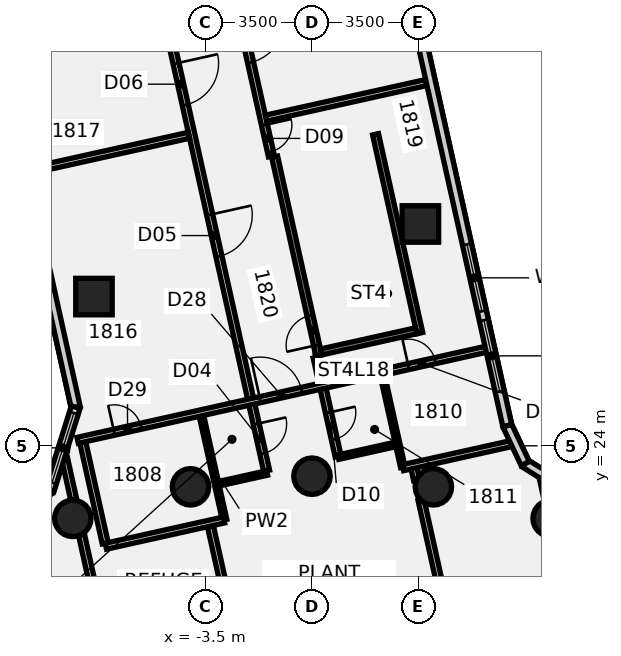
"""IFC4 building model, lengths in metres.
Left out: names, types, materials, properties, quantities, classifications, styles, units other than length and angle.
Written with IfcOpenShell. Run it as: python <this file> out.ifc"""

import sys

from ifc_helpers import new_model, si_unit, direction, frame, frame_2d, origin, origin_2d, place, context, subcontext, project, spatial, polyline, rectangle, circle, outline, extrude, element, fill, save


model = new_model("IFC4")
c1 = context("Model", 3, precision=1e-05, world=origin(), true_north=direction((0.0, 1.0)))
c2 = subcontext(c1, "Body", "Model", "MODEL_VIEW")
j1 = project(units=[si_unit("LENGTHUNIT", "METRE"), si_unit("PLANEANGLEUNIT", "RADIAN")], contexts=[c1])
p1 = place(None, origin())
s1 = spatial("IfcSite", under=j1, at=p1, CompositionType="ELEMENT")
p2 = place(p1, origin())
s2 = spatial("IfcBuilding", under=s1, at=p2, CompositionType="ELEMENT")
p3 = place(p2, frame((0.0, 0.0, 79.0)))
s3 = spatial("IfcBuildingStorey", under=s2, at=p3, CompositionType="ELEMENT", Elevation=79.0)
for number, where, z_axis, x_axis in (
    (1, (7.866, 21.613, -0.18), (0.0, 0.0, 1.0), (1.0, 0.0, 0.0)),
    (2, (3.994, 22.651, -0.18), (0.0, 0.0, 1.0), (1.0, 0.0, 0.0)),
    (3, (0.0, 23.0, -0.18), (0.0, 0.0, 1.0), (1.0, 0.0, 0.0)),
    (4, (-3.994, 22.651, -0.18), (0.0, 0.0, 1.0), (1.0, 0.0, 0.0)),
    (5, (-7.866, 21.613, -0.18), (0.0, 0.0, 1.0), (1.0, 0.0, 0.0)),
):
    element("IfcColumn", number, at=place(p3, frame(where, z_axis=z_axis, x_axis=x_axis)), inside=s3, PredefinedType="COLUMN", context=c2, shape_type="SweptSolid", body=[
        extrude(circle(Radius=0.6, at=origin_2d()), origin(), (0.0, 0.0, 1.0), 4.54),
    ])
p4 = place(p3, frame((-9.125, 37.693, -0.173), z_axis=(-0.06251280535, -0.037120340526, 0.997353613061), x_axis=(0.973970607022, 0.215890896147, 0.069082397308)))
e6 = element("IfcColumn", 6, at=p4, inside=s3, PredefinedType="COLUMN", context=c2, shape_type="SweptSolid", body=[
    extrude(rectangle(XDim=1.2, YDim=1.2, at=origin_2d()), origin(), (0.0, 0.0, 1.0), 4.538),
])
p5 = place(p3, frame((-7.171, 28.908, -0.175), z_axis=(-0.027459467491, -0.029020888191, 0.999201564097), x_axis=(0.975725272019, 0.21648201457, 0.033101826414)))
e7 = element("IfcColumn", 7, at=p5, inside=s3, PredefinedType="COLUMN", context=c2, shape_type="SweptSolid", body=[
    extrude(rectangle(XDim=1.2, YDim=1.2, at=origin_2d()), origin(), (0.0, 0.0, 1.0), 4.534),
])
p6 = place(p3, frame((3.567, 31.296, -0.175), z_axis=(-0.037418269579, 0.013944362332, 0.999202395844), x_axis=(0.21721764254, -0.975880776515, 0.021753293964)))
e8 = element("IfcColumn", 8, at=p6, inside=s3, PredefinedType="COLUMN", context=c2, shape_type="SweptSolid", body=[
    extrude(rectangle(XDim=1.2, YDim=1.2, at=origin_2d()), origin(), (0.0, 0.0, 1.0), 4.535),
])
p7 = place(p3, frame((-8.14, 23.592, 0.0), z_axis=(0.0, 0.0, 1.0), x_axis=(0.21709529859, -0.976150414296, 0.0)))
e9 = element("IfcWall", 9, at=p7, inside=s3, PredefinedType="PARTITIONING", context=c2, shape_type="SweptSolid", body=[
    extrude(rectangle(XDim=1.411, YDim=0.2, at=frame_2d((0.706, 0.0))), origin(), (0.0, 0.0, 1.0), 3.66),
])
p8 = place(p3, frame((-7.581, 21.079, 0.0), z_axis=(0.0, 0.0, 1.0), x_axis=(0.217055556544, -0.976159252055, 0.0)))
e10 = element("IfcWall", 10, at=p8, inside=s3, PredefinedType="PARTITIONING", context=c2, shape_type="SweptSolid", body=[
    extrude(rectangle(XDim=9.299, YDim=0.2, at=frame_2d((4.649, 0.0))), origin(), (0.0, 0.0, 1.0), 3.66),
])
p9 = place(p3, frame((-7.538, 24.115, 0.0), z_axis=(0.0, 0.0, 1.0), x_axis=(0.216877248521, -0.976198882951, 0.0)))
e11 = element("IfcWall", 11, at=p9, inside=s3, PredefinedType="PARTITIONING", context=c2, shape_type="SweptSolid", body=[
    extrude(rectangle(XDim=3.401, YDim=0.2, at=frame_2d((1.7, 0.0))), origin(), (0.0, 0.0, 1.0), 3.66),
])
p10 = place(p3, frame((-4.905, 38.529, 0.0), z_axis=(0.0, 0.0, 1.0), x_axis=(0.217093198674, -0.976150881314, 0.0)))
e12 = element("IfcWall", 12, at=p10, inside=s3, PredefinedType="PARTITIONING", context=c2, shape_type="SweptSolid", body=[
    extrude(rectangle(XDim=15.725, YDim=0.2, at=frame_2d((7.863, 0.0))), origin(), (0.0, 0.0, 1.0), 3.66),
])
p11 = place(p10, frame((14.15, 0.0, 0.0)))
e13 = element("IfcOpeningElement", 13, at=p11, cuts=e12, PredefinedType="OPENING", context=c2, shape_type="SweptSolid", body=[
    extrude(rectangle(XDim=1.0, YDim=2.1, at=frame_2d((0.5, 1.05))), frame((0.0, 0.11, 0.0), z_axis=(0.0, -1.0, 0.0), x_axis=(1.0, 0.0, 0.0)), (0.0, 0.0, 1.0), 0.22),
])
p12 = place(p10, frame((7.1, 0.0, 0.0)))
e14 = element("IfcOpeningElement", 14, at=p12, cuts=e12, PredefinedType="OPENING", context=c2, shape_type="SweptSolid", body=[
    extrude(rectangle(XDim=1.4, YDim=2.1, at=frame_2d((0.7, 1.05))), frame((0.0, 0.11, 0.0), z_axis=(0.0, -1.0, 0.0), x_axis=(1.0, 0.0, 0.0)), (0.0, 0.0, 1.0), 0.22),
])
p13 = place(p10, frame((2.0, 0.0, 0.0)))
e15 = element("IfcOpeningElement", 15, at=p13, cuts=e12, PredefinedType="OPENING", context=c2, shape_type="SweptSolid", body=[
    extrude(rectangle(XDim=1.4, YDim=2.1, at=frame_2d((0.7, 1.05))), frame((0.0, 0.11, 0.0), z_axis=(0.0, -1.0, 0.0), x_axis=(1.0, 0.0, 0.0)), (0.0, 0.0, 1.0), 0.22),
])
p14 = place(p3, frame((-3.634, 24.982, 0.0), z_axis=(0.0, 0.0, 1.0), x_axis=(0.217211102437, -0.976124652377, 0.0)))
e16 = element("IfcWall", 16, at=p14, inside=s3, PredefinedType="PARTITIONING", context=c2, shape_type="SweptSolid", body=[
    extrude(rectangle(XDim=3.5, YDim=0.15, at=frame_2d((1.75, 0.0))), origin(), (0.0, 0.0, 1.0), 3.66),
])
p15 = place(p3, frame((-3.34, 21.359, 0.0), z_axis=(0.0, 0.0, 1.0), x_axis=(0.217054509475, -0.976159484878, 0.0)))
e17 = element("IfcWall", 17, at=p15, inside=s3, PredefinedType="PARTITIONING", context=c2, shape_type="SweptSolid", body=[
    extrude(rectangle(XDim=9.585, YDim=0.2, at=frame_2d((4.793, 0.0))), origin(), (0.0, 0.0, 1.0), 3.66),
])
p16 = place(p15, frame((5.0, 0.0, 0.0)))
e18 = element("IfcOpeningElement", 18, at=p16, cuts=e17, PredefinedType="OPENING", context=c2, shape_type="SweptSolid", body=[
    extrude(rectangle(XDim=1.8, YDim=2.1, at=frame_2d((0.9, 1.05))), frame((0.0, 0.11, 0.0), z_axis=(0.0, -1.0, 0.0), x_axis=(1.0, 0.0, 0.0)), (0.0, 0.0, 1.0), 0.22),
])
p17 = place(p3, frame((-2.562, 39.05, 0.0), z_axis=(0.0, 0.0, 1.0), x_axis=(0.217021787463, -0.976166760224, 0.0)))
e19 = element("IfcWall", 19, at=p17, inside=s3, PredefinedType="PARTITIONING", context=c2, shape_type="SweptSolid", body=[
    extrude(rectangle(XDim=5.661, YDim=0.2, at=frame_2d((2.831, 0.0))), origin(), (0.0, 0.0, 1.0), 3.66),
])
p18 = place(p17, frame((1.1, 0.0, 0.0)))
e20 = element("IfcOpeningElement", 20, at=p18, cuts=e19, PredefinedType="OPENING", context=c2, shape_type="SweptSolid", body=[
    extrude(rectangle(XDim=1.4, YDim=2.1, at=frame_2d((0.7, 1.05))), frame((0.0, 0.11, 0.0), z_axis=(0.0, -1.0, 0.0), x_axis=(1.0, 0.0, 0.0)), (0.0, 0.0, 1.0), 0.22),
])
p19 = place(p17, frame((4.611, 0.0, 0.0)))
e21 = element("IfcOpeningElement", 21, at=p19, cuts=e19, PredefinedType="OPENING", context=c2, shape_type="SweptSolid", body=[
    extrude(rectangle(XDim=0.9, YDim=2.1, at=frame_2d((0.45, 1.05))), frame((0.0, 0.11, 0.0), z_axis=(0.0, -1.0, 0.0), x_axis=(1.0, 0.0, 0.0)), (0.0, 0.0, 1.0), 0.22),
])
p20 = place(p3, frame((0.138, 26.907, 0.0), z_axis=(0.0, 0.0, 1.0), x_axis=(0.217031075357, -0.976164695289, 0.0)))
e22 = element("IfcWall", 22, at=p20, inside=s3, PredefinedType="PARTITIONING", context=c2, shape_type="SweptSolid", body=[
    extrude(rectangle(XDim=3.34, YDim=0.2, at=frame_2d((1.67, 0.0))), origin(), (0.0, 0.0, 1.0), 3.66),
])
p21 = place(p20, frame((1.86, 0.0, 0.0)))
e23 = element("IfcOpeningElement", 23, at=p21, cuts=e22, PredefinedType="OPENING", context=c2, shape_type="SweptSolid", body=[
    extrude(rectangle(XDim=0.9, YDim=2.1, at=frame_2d((0.45, 1.05))), frame((0.0, 0.11, 0.0), z_axis=(0.0, -1.0, 0.0), x_axis=(1.0, 0.0, 0.0)), (0.0, 0.0, 1.0), 0.22),
])
p22 = place(p3, frame((2.32, 26.311, 0.0), z_axis=(0.0, 0.0, 1.0), x_axis=(0.216662333141, -0.976246604807, 0.0)))
e24 = element("IfcWall", 24, at=p22, inside=s3, PredefinedType="PARTITIONING", context=c2, shape_type="SweptSolid", body=[
    extrude(rectangle(XDim=3.085, YDim=0.15, at=frame_2d((1.542, 0.0))), origin(), (0.0, 0.0, 1.0), 3.66),
])
p23 = place(p3, frame((3.357, 23.258, 0.0), z_axis=(0.0, 0.0, 1.0), x_axis=(0.216995545152, -0.976172594055, 0.0)))
e25 = element("IfcWall", 25, at=p23, inside=s3, PredefinedType="PARTITIONING", context=c2, shape_type="SweptSolid", body=[
    extrude(rectangle(XDim=0.397, YDim=0.2, at=frame_2d((0.199, 0.0))), origin(), (0.0, 0.0, 1.0), 3.66),
])
p24 = place(p3, frame((3.587, 22.225, 0.0), z_axis=(0.0, 0.0, 1.0), x_axis=(0.21703911185, -0.976162908498, 0.0)))
e26 = element("IfcWall", 26, at=p24, inside=s3, PredefinedType="PARTITIONING", context=c2, shape_type="SweptSolid", body=[
    extrude(rectangle(XDim=10.468, YDim=0.2, at=frame_2d((5.234, 0.0))), origin(), (0.0, 0.0, 1.0), 3.66),
])
p25 = place(p24, frame((3.15, 0.0, 0.0)))
e27 = element("IfcOpeningElement", 27, at=p25, cuts=e26, PredefinedType="OPENING", context=c2, shape_type="SweptSolid", body=[
    extrude(rectangle(XDim=1.8, YDim=2.1, at=frame_2d((0.9, 1.05))), frame((0.0, 0.11, 0.0), z_axis=(0.0, -1.0, 0.0), x_axis=(1.0, 0.0, 0.0)), (0.0, 0.0, 1.0), 0.22),
])
p26 = place(p3, frame((7.589, 22.882, 0.0), z_axis=(0.0, 0.0, 1.0), x_axis=(0.217003399532, -0.976170848055, 0.0)))
e28 = element("IfcWall", 28, at=p26, inside=s3, PredefinedType="PARTITIONING", context=c2, shape_type="SweptSolid", body=[
    extrude(rectangle(XDim=0.709, YDim=0.2, at=frame_2d((0.354, 0.0))), origin(), (0.0, 0.0, 1.0), 3.66),
])
p27 = place(p3, frame((-9.333, 33.037, 0.0), z_axis=(0.0, 0.0, 1.0), x_axis=(0.976161593011, 0.217045028348, 0.0)))
e29 = element("IfcWall", 29, at=p27, inside=s3, PredefinedType="PARTITIONING", context=c2, shape_type="SweptSolid", body=[
    extrude(rectangle(XDim=5.415, YDim=0.2, at=frame_2d((2.708, 0.0))), origin(), (0.0, 0.0, 1.0), 3.66),
])
p28 = place(p3, frame((-1.51, 34.777, 0.0), z_axis=(0.0, 0.0, 1.0), x_axis=(0.976168968701, 0.217011853467, 0.0)))
e30 = element("IfcWall", 30, at=p28, inside=s3, PredefinedType="PARTITIONING", context=c2, shape_type="SweptSolid", body=[
    extrude(rectangle(XDim=5.399, YDim=0.2, at=frame_2d((2.699, 0.0))), origin(), (0.0, 0.0, 1.0), 3.66),
])
p29 = place(p3, frame((-7.707, 24.179, 0.0), z_axis=(0.0, 0.0, 1.0), x_axis=(0.976033065583, 0.21762227572, 0.0)))
e31 = element("IfcWall", 31, at=p29, inside=s3, PredefinedType="PARTITIONING", context=c2, shape_type="SweptSolid", body=[
    extrude(rectangle(XDim=13.75, YDim=0.2, at=frame_2d((6.875, 0.0))), origin(), (0.0, 0.0, 1.0), 3.66),
])
p30 = place(p29, frame((6.151, 0.0, 0.0)))
e32 = element("IfcOpeningElement", 32, at=p30, cuts=e31, PredefinedType="OPENING", context=c2, shape_type="SweptSolid", body=[
    extrude(rectangle(XDim=1.4, YDim=2.1, at=frame_2d((0.7, 1.05))), frame((0.0, 0.11, 0.0), z_axis=(0.0, -1.0, 0.0), x_axis=(1.0, 0.0, 0.0)), (0.0, 0.0, 1.0), 0.22),
])
p31 = place(p29, frame((1.23, 0.0, 0.0)))
e33 = element("IfcOpeningElement", 33, at=p31, cuts=e31, PredefinedType="OPENING", context=c2, shape_type="SweptSolid", body=[
    extrude(rectangle(XDim=0.9, YDim=2.1, at=frame_2d((0.45, 1.05))), frame((0.0, 0.11, 0.0), z_axis=(0.0, -1.0, 0.0), x_axis=(1.0, 0.0, 0.0)), (0.0, 0.0, 1.0), 0.22),
])
p32 = place(p29, frame((11.151, 0.0, 0.0)))
e34 = element("IfcOpeningElement", 34, at=p32, cuts=e31, PredefinedType="OPENING", context=c2, shape_type="SweptSolid", body=[
    extrude(rectangle(XDim=0.9, YDim=2.1, at=frame_2d((0.45, 1.05))), frame((0.0, 0.11, 0.0), z_axis=(0.0, -1.0, 0.0), x_axis=(1.0, 0.0, 0.0)), (0.0, 0.0, 1.0), 0.22),
])
p33 = place(p3, frame((-6.779, 20.697, 0.0), z_axis=(0.0, 0.0, 1.0), x_axis=(0.976146636843, 0.217112282887, 0.0)))
e35 = element("IfcWall", 35, at=p33, inside=s3, PredefinedType="PARTITIONING", context=c2, shape_type="SweptSolid", body=[
    extrude(rectangle(XDim=3.981, YDim=0.2, at=frame_2d((1.99, 0.0))), origin(), (0.0, 0.0, 1.0), 3.66),
])
p34 = place(p3, frame((-3.057, 22.754, 0.0), z_axis=(0.0, 0.0, 1.0), x_axis=(0.976179969389, 0.216962363933, 0.0)))
e36 = element("IfcWall", 36, at=p34, inside=s3, PredefinedType="PARTITIONING", context=c2, shape_type="SweptSolid", body=[
    extrude(rectangle(XDim=1.62, YDim=0.15, at=frame_2d((0.81, 0.0))), origin(), (0.0, 0.0, 1.0), 3.66),
])
p35 = place(p3, frame((0.867, 23.627, 0.0), z_axis=(0.0, 0.0, 1.0), x_axis=(0.976187060184, 0.216930457819, 0.0)))
e37 = element("IfcWall", 37, at=p35, inside=s3, PredefinedType="PARTITIONING", context=c2, shape_type="SweptSolid", body=[
    extrude(rectangle(XDim=1.925, YDim=0.15, at=frame_2d((0.962, 0.0))), origin(), (0.0, 0.0, 1.0), 3.66),
])
p36 = place(p3, frame((2.993, 23.28, 0.0), z_axis=(0.0, 0.0, 1.0), x_axis=(0.976190222355, 0.21691622756, 0.0)))
e38 = element("IfcWall", 38, at=p36, inside=s3, PredefinedType="PARTITIONING", context=c2, shape_type="SweptSolid", body=[
    extrude(rectangle(XDim=3.633, YDim=0.2, at=frame_2d((1.816, 0.0))), origin(), (0.0, 0.0, 1.0), 3.66),
])
p37 = place(p3, frame((9.483, 21.879, 0.0), z_axis=(0.0, 0.0, 1.0), x_axis=(-0.848648189987, 0.528957701174, 0.0)))
e39 = element("IfcWall", 39, at=p37, inside=s3, PredefinedType="SOLIDWALL", context=c2, shape_type="SweptSolid", body=[
    extrude(rectangle(XDim=2.91, YDim=0.3, at=frame_2d((1.455, 0.0))), origin(), (0.0, 0.0, 1.0), 4.36),
])
p38 = place(p37, frame((0.39, 0.0, 1.4)))
e40 = element("IfcOpeningElement", 40, at=p38, cuts=e39, PredefinedType="OPENING", context=c2, shape_type="SweptSolid", body=[
    extrude(rectangle(XDim=1.5, YDim=1.0, at=frame_2d((0.75, 0.5))), frame((0.0, 0.16, 0.0), z_axis=(0.0, -1.0, 0.0), x_axis=(1.0, 0.0, 0.0)), (0.0, 0.0, 1.0), 0.32),
])
p39 = place(p3, frame((7.014, 23.418, 0.0), z_axis=(0.0, 0.0, 1.0), x_axis=(-0.427195365071, 0.904159344398, 0.0)))
e41 = element("IfcWall", 41, at=p39, inside=s3, PredefinedType="SOLIDWALL", context=c2, shape_type="SweptSolid", body=[
    extrude(rectangle(XDim=1.378, YDim=0.3, at=frame_2d((0.689, 0.0))), origin(), (0.0, 0.0, 1.0), 4.36),
])
p40 = place(p3, frame((6.425, 24.665, 0.0), z_axis=(0.0, 0.0, 1.0), x_axis=(-0.217081929523, 0.976153387473, 0.0)))
e42 = element("IfcWall", 42, at=p40, inside=s3, PredefinedType="SOLIDWALL", context=c2, shape_type="SweptSolid", body=[
    extrude(rectangle(XDim=23.892, YDim=0.3, at=frame_2d((11.946, 0.0))), origin(), (0.0, 0.0, 1.0), 4.36),
])
p41 = place(p40, frame((3.852, 0.0, 1.4)))
e43 = element("IfcOpeningElement", 43, at=p41, cuts=e42, PredefinedType="OPENING", context=c2, shape_type="SweptSolid", body=[
    extrude(rectangle(XDim=2.254, YDim=2.6, at=frame_2d((1.127, 1.3))), frame((0.0, 0.16, 0.0), z_axis=(0.0, -1.0, 0.0), x_axis=(1.0, 0.0, 0.0)), (0.0, 0.0, 1.0), 0.32),
])
p42 = place(p40, frame((1.15, 0.0, 1.4)))
e44 = element("IfcOpeningElement", 44, at=p42, cuts=e42, PredefinedType="OPENING", context=c2, shape_type="SweptSolid", body=[
    extrude(rectangle(XDim=2.4, YDim=2.1, at=frame_2d((1.2, 1.05))), frame((0.0, 0.16, 0.0), z_axis=(0.0, -1.0, 0.0), x_axis=(1.0, 0.0, 0.0)), (0.0, 0.0, 1.0), 0.32),
])
p43 = place(p3, frame((-12.135, 45.013, 0.0), z_axis=(0.0, 0.0, 1.0), x_axis=(0.215816840295, -0.976433864348, 0.0)))
e45 = element("IfcWall", 45, at=p43, inside=s3, PredefinedType="SOLIDWALL", context=c2, shape_type="SweptSolid", body=[
    extrude(rectangle(XDim=20.221, YDim=0.3, at=frame_2d((10.11, 0.0))), origin(), (0.0, 0.0, 1.0), 4.36),
])
p44 = place(p43, frame((5.71, 0.0, 1.4)))
e46 = element("IfcOpeningElement", 46, at=p44, cuts=e45, PredefinedType="OPENING", context=c2, shape_type="SweptSolid", body=[
    extrude(rectangle(XDim=2.4, YDim=2.1, at=frame_2d((1.2, 1.05))), frame((0.0, 0.16, 0.0), z_axis=(0.0, -1.0, 0.0), x_axis=(1.0, 0.0, 0.0)), (0.0, 0.0, 1.0), 0.32),
])
p45 = place(p3, frame((-7.771, 25.268, 0.0), z_axis=(0.0, 0.0, 1.0), x_axis=(-0.299577096006, -0.954072095572, 0.0)))
e47 = element("IfcWall", 47, at=p45, inside=s3, PredefinedType="SOLIDWALL", context=c2, shape_type="SweptSolid", body=[
    extrude(rectangle(XDim=2.85, YDim=0.3, at=frame_2d((1.425, 0.0))), origin(), (0.0, 0.0, 1.0), 4.36),
])
p46 = place(p45, frame((0.2, 0.0, 1.4)))
e48 = element("IfcOpeningElement", 48, at=p46, cuts=e47, PredefinedType="OPENING", context=c2, shape_type="SweptSolid", body=[
    extrude(rectangle(XDim=2.4, YDim=2.1, at=frame_2d((1.2, 1.05))), frame((0.0, 0.16, 0.0), z_axis=(0.0, -1.0, 0.0), x_axis=(1.0, 0.0, 0.0)), (0.0, 0.0, 1.0), 0.32),
])
p47 = place(p3, frame((-8.625, 22.549, 0.0), z_axis=(0.0, 0.0, 1.0), x_axis=(-0.86583904671, -0.500322641095, 0.0)))
e49 = element("IfcWall", 49, at=p47, inside=s3, PredefinedType="SOLIDWALL", context=c2, shape_type="SweptSolid", body=[
    extrude(rectangle(XDim=3.251, YDim=0.3, at=frame_2d((1.625, 0.0))), origin(), (0.0, 0.0, 1.0), 4.36),
])
p48 = place(p3, frame((0.227, 26.968, -0.18), z_axis=(0.0, 0.0, 1.0), x_axis=(-0.217065493376, 0.976157042481, 0.0)))
e50 = element("IfcWall", 50, at=p48, inside=s3, PredefinedType="SHEAR", context=c2, shape_type="SweptSolid", body=[
    extrude(rectangle(XDim=6.7, YDim=0.2, at=frame_2d((3.35, 0.0))), origin(), (0.0, 0.0, 1.0), 3.94),
])
p49 = place(p48, frame((0.35, 0.0, 0.0)))
e51 = element("IfcOpeningElement", 51, at=p49, cuts=e50, PredefinedType="OPENING", context=c2, shape_type="SweptSolid", body=[
    extrude(rectangle(XDim=1.0, YDim=2.1, at=frame_2d((0.5, 1.05))), frame((0.0, 0.11, 0.0), z_axis=(0.0, -1.0, 0.0), x_axis=(1.0, 0.0, 0.0)), (0.0, 0.0, 1.0), 0.22),
])
p50 = place(p3, frame((3.546, 27.706, -0.18), z_axis=(0.0, 0.0, 1.0), x_axis=(-0.217065493376, 0.976157042481, 0.0)))
e52 = element("IfcWall", 52, at=p50, inside=s3, PredefinedType="SHEAR", context=c2, shape_type="SweptSolid", body=[
    extrude(rectangle(XDim=6.7, YDim=0.2, at=frame_2d((3.35, 0.0))), origin(), (0.0, 0.0, 1.0), 3.94),
])
p51 = place(p3, frame((3.427, 27.782, -0.18), z_axis=(0.0, 0.0, 1.0), x_axis=(-0.976156531326, -0.21706779206, 0.0)))
e53 = element("IfcWall", 53, at=p51, inside=s3, PredefinedType="SHEAR", context=c2, shape_type="SweptSolid", body=[
    extrude(rectangle(XDim=3.2, YDim=0.2, at=frame_2d((1.6, 0.0))), origin(), (0.0, 0.0, 1.0), 3.94),
])
p52 = place(p3, frame((0.0, 0.0, -0.18)))
e54 = element("IfcWall", 54, at=p52, inside=s3, PredefinedType="SHEAR", context=c2, shape_type="SweptSolid", body=[
    extrude(outline(polyline([(2.037, 34.029), (1.994, 34.224), (-1.13, 33.53), (-1.086, 33.334), (2.037, 34.029)])), origin(), (0.0, 0.0, 1.0), 3.94),
])
p53 = place(p11, frame((1.0, 0.0, 0.0), z_axis=(0.0, 0.0, 1.0), x_axis=(-1.0, 0.0, 0.0)))
e55 = element("IfcDoor", 55, at=p53, inside=s3, OperationType="SINGLE_SWING_RIGHT", PredefinedType="DOOR", context=c2, shape_type="SweptSolid", body=[
    extrude(rectangle(XDim=1.0, YDim=2.1, at=frame_2d((0.5, 1.05))), frame((0.0, 0.025, 0.0), z_axis=(0.0, -1.0, 0.0), x_axis=(1.0, 0.0, 0.0)), (0.0, 0.0, 1.0), 0.05),
])
fill(e13, e55)
p54 = place(p12, frame((1.4, 0.0, 0.0), z_axis=(0.0, 0.0, 1.0), x_axis=(-1.0, 0.0, 0.0)))
e56 = element("IfcDoor", 56, at=p54, inside=s3, OperationType="DOUBLE_DOOR_SINGLE_SWING", PredefinedType="DOOR", context=c2, shape_type="SweptSolid", body=[
    extrude(rectangle(XDim=1.4, YDim=2.1, at=frame_2d((0.7, 1.05))), frame((0.0, 0.025, 0.0), z_axis=(0.0, -1.0, 0.0), x_axis=(1.0, 0.0, 0.0)), (0.0, 0.0, 1.0), 0.05),
])
fill(e14, e56)
p55 = place(p13, frame((1.4, 0.0, 0.0), z_axis=(0.0, 0.0, 1.0), x_axis=(-1.0, 0.0, 0.0)))
e57 = element("IfcDoor", 57, at=p55, inside=s3, OperationType="DOUBLE_DOOR_SINGLE_SWING", PredefinedType="DOOR", context=c2, shape_type="SweptSolid", body=[
    extrude(rectangle(XDim=1.4, YDim=2.1, at=frame_2d((0.7, 1.05))), frame((0.0, 0.025, 0.0), z_axis=(0.0, -1.0, 0.0), x_axis=(1.0, 0.0, 0.0)), (0.0, 0.0, 1.0), 0.05),
])
fill(e15, e57)
p56 = place(p18, origin())
e58 = element("IfcDoor", 58, at=p56, inside=s3, OperationType="DOUBLE_DOOR_SINGLE_SWING", PredefinedType="DOOR", context=c2, shape_type="SweptSolid", body=[
    extrude(rectangle(XDim=1.4, YDim=2.1, at=frame_2d((0.7, 1.05))), frame((0.0, 0.025, 0.0), z_axis=(0.0, -1.0, 0.0), x_axis=(1.0, 0.0, 0.0)), (0.0, 0.0, 1.0), 0.05),
])
fill(e20, e58)
p57 = place(p19, origin())
e59 = element("IfcDoor", 59, at=p57, inside=s3, OperationType="SINGLE_SWING_LEFT", PredefinedType="DOOR", context=c2, shape_type="SweptSolid", body=[
    extrude(rectangle(XDim=0.9, YDim=2.1, at=frame_2d((0.45, 1.05))), frame((0.0, 0.025, 0.0), z_axis=(0.0, -1.0, 0.0), x_axis=(1.0, 0.0, 0.0)), (0.0, 0.0, 1.0), 0.05),
])
fill(e21, e59)
p58 = place(p21, origin())
e60 = element("IfcDoor", 60, at=p58, inside=s3, OperationType="SINGLE_SWING_LEFT", PredefinedType="DOOR", context=c2, shape_type="SweptSolid", body=[
    extrude(rectangle(XDim=0.9, YDim=2.1, at=frame_2d((0.45, 1.05))), frame((0.0, 0.025, 0.0), z_axis=(0.0, -1.0, 0.0), x_axis=(1.0, 0.0, 0.0)), (0.0, 0.0, 1.0), 0.05),
])
fill(e23, e60)
p59 = place(p30, frame((1.4, 0.0, 0.0), z_axis=(0.0, 0.0, 1.0), x_axis=(-1.0, 0.0, 0.0)))
e61 = element("IfcDoor", 61, at=p59, inside=s3, OperationType="DOUBLE_DOOR_SINGLE_SWING", PredefinedType="DOOR", context=c2, shape_type="SweptSolid", body=[
    extrude(rectangle(XDim=1.4, YDim=2.1, at=frame_2d((0.7, 1.05))), frame((0.0, 0.025, 0.0), z_axis=(0.0, -1.0, 0.0), x_axis=(1.0, 0.0, 0.0)), (0.0, 0.0, 1.0), 0.05),
])
fill(e32, e61)
p60 = place(p31, frame((0.9, 0.0, 0.0), z_axis=(0.0, 0.0, 1.0), x_axis=(-1.0, 0.0, 0.0)))
e62 = element("IfcDoor", 62, at=p60, inside=s3, OperationType="SINGLE_SWING_LEFT", PredefinedType="DOOR", context=c2, shape_type="SweptSolid", body=[
    extrude(rectangle(XDim=0.9, YDim=2.1, at=frame_2d((0.45, 1.05))), frame((0.0, 0.025, 0.0), z_axis=(0.0, -1.0, 0.0), x_axis=(1.0, 0.0, 0.0)), (0.0, 0.0, 1.0), 0.05),
])
fill(e33, e62)
p61 = place(p32, frame((0.9, 0.0, 0.0), z_axis=(0.0, 0.0, 1.0), x_axis=(-1.0, 0.0, 0.0)))
e63 = element("IfcDoor", 63, at=p61, inside=s3, OperationType="SINGLE_SWING_RIGHT", PredefinedType="DOOR", context=c2, shape_type="SweptSolid", body=[
    extrude(rectangle(XDim=0.9, YDim=2.1, at=frame_2d((0.45, 1.05))), frame((0.0, 0.025, 0.0), z_axis=(0.0, -1.0, 0.0), x_axis=(1.0, 0.0, 0.0)), (0.0, 0.0, 1.0), 0.05),
])
fill(e34, e63)
p62 = place(p41, origin())
e64 = element("IfcWindow", 64, at=p62, inside=s3, PartitioningType="SINGLE_PANEL", PredefinedType="WINDOW", context=c2, shape_type="SweptSolid", body=[
    extrude(rectangle(XDim=2.254, YDim=2.6, at=frame_2d((1.127, 1.3))), frame((0.0, 0.03, 0.0), z_axis=(0.0, -1.0, 0.0), x_axis=(1.0, 0.0, 0.0)), (0.0, 0.0, 1.0), 0.06),
])
fill(e43, e64)
p63 = place(p42, origin())
e65 = element("IfcWindow", 65, at=p63, inside=s3, PartitioningType="SINGLE_PANEL", PredefinedType="WINDOW", context=c2, shape_type="SweptSolid", body=[
    extrude(rectangle(XDim=2.4, YDim=2.1, at=frame_2d((1.2, 1.05))), frame((0.0, 0.03, 0.0), z_axis=(0.0, -1.0, 0.0), x_axis=(1.0, 0.0, 0.0)), (0.0, 0.0, 1.0), 0.06),
])
fill(e44, e65)
p64 = place(p46, origin())
e66 = element("IfcWindow", 66, at=p64, inside=s3, PartitioningType="SINGLE_PANEL", PredefinedType="WINDOW", context=c2, shape_type="SweptSolid", body=[
    extrude(rectangle(XDim=2.4, YDim=2.1, at=frame_2d((1.2, 1.05))), frame((0.0, 0.03, 0.0), z_axis=(0.0, -1.0, 0.0), x_axis=(1.0, 0.0, 0.0)), (0.0, 0.0, 1.0), 0.06),
])
fill(e48, e66)
p65 = place(p49, origin())
e67 = element("IfcDoor", 67, at=p65, inside=s3, OperationType="SINGLE_SWING_LEFT", PredefinedType="DOOR", context=c2, shape_type="SweptSolid", body=[
    extrude(rectangle(XDim=1.0, YDim=2.1, at=frame_2d((0.5, 1.05))), frame((0.0, 0.025, 0.0), z_axis=(0.0, -1.0, 0.0), x_axis=(1.0, 0.0, 0.0)), (0.0, 0.0, 1.0), 0.05),
])
fill(e51, e67)
save(model, sys.argv[1])
